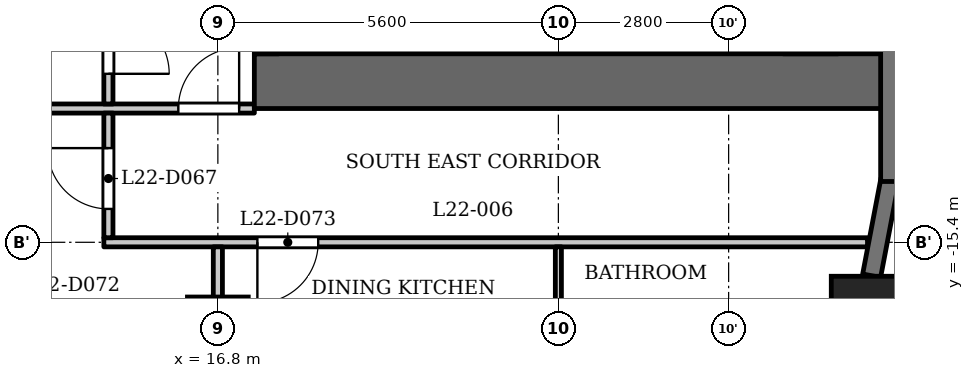
"""IFC4 building model, lengths in metres.
Left out: names, types, materials, properties, quantities, classifications, styles, units other than length and angle.
Written with IfcOpenShell. Run it as: python <this file> out.ifc"""

import sys

from ifc_helpers import new_model, si_unit, direction, frame, frame_2d, origin, origin_2d, place, context, subcontext, project, spatial, rectangle, extrude, element, fill, save


model = new_model("IFC4")
c1 = context("Model", 3, precision=1e-05, world=origin(), true_north=direction((0.0, 1.0)))
c2 = subcontext(c1, "Body", "Model", "MODEL_VIEW")
j1 = project(units=[si_unit("LENGTHUNIT", "METRE"), si_unit("PLANEANGLEUNIT", "RADIAN")], contexts=[c1])
p1 = place(None, origin())
s1 = spatial("IfcSite", under=j1, at=p1, CompositionType="ELEMENT")
p2 = place(p1, origin())
s2 = spatial("IfcBuilding", under=s1, at=p2, CompositionType="ELEMENT")
p3 = place(p2, frame((0.0, 0.0, 90.3)))
s3 = spatial("IfcBuildingStorey", under=s2, at=p3, CompositionType="ELEMENT", Elevation=90.3)
p4 = place(p3, frame((27.538, -16.609, 0.0), z_axis=(0.0, 0.0, 1.0), x_axis=(1.0, 0.0, 0.0)))
e1 = element("IfcColumn", 1, at=p4, inside=s3, PredefinedType="COLUMN", context=c2, shape_type="SweptSolid", body=[
    extrude(rectangle(XDim=1.3, YDim=1.3, at=origin_2d()), origin(), (0.0, 0.0, 1.0), 3.5),
])
p5 = place(p3, frame((16.8, -16.8, 0.0), z_axis=(0.0, 0.0, 1.0), x_axis=(1.0, 0.0, 0.0)))
e2 = element("IfcColumn", 2, at=p5, inside=s3, PredefinedType="COLUMN", context=c2, shape_type="SweptSolid", body=[
    extrude(rectangle(XDim=1.0, YDim=1.0, at=origin_2d()), origin(), (0.0, 0.0, 1.0), 3.5),
])
p6 = place(p3, frame((27.552, -15.949, 0.0), z_axis=(0.0, 0.0, 1.0), x_axis=(0.187279751651, 0.982306619453, 0.0)))
e3 = element("IfcWall", 3, at=p6, inside=s3, PredefinedType="SOLIDWALL", context=c2, shape_type="SweptSolid", body=[
    extrude(rectangle(XDim=1.606, YDim=0.3, at=frame_2d((0.803, 0.0))), origin(), (0.0, 0.0, 1.0), 2.4),
])
p7 = place(p3, frame((27.85, -14.4, 0.0), z_axis=(0.0, 0.0, 1.0), x_axis=(0.0, 1.0, 0.0)))
e4 = element("IfcWall", 4, at=p7, inside=s3, PredefinedType="SOLIDWALL", context=c2, shape_type="SweptSolid", body=[
    extrude(rectangle(XDim=2.55, YDim=0.3, at=frame_2d((1.275, 0.0))), origin(), (0.0, 0.0, 1.0), 2.4),
])
p8 = place(p3, frame((17.4, -12.75, 0.0), z_axis=(0.0, 0.0, 1.0), x_axis=(1.0, 0.0, 0.0)))
e5 = element("IfcWall", 5, at=p8, inside=s3, PredefinedType="SHEAR", context=c2, shape_type="SweptSolid", body=[
    extrude(rectangle(XDim=10.4, YDim=0.9, at=frame_2d((5.2, 0.0))), origin(), (0.0, 0.0, 1.0), 3.2),
])
p9 = place(p3, frame((17.6, -12.3, 0.0), z_axis=(0.0, 0.0, 1.0), x_axis=(0.0, 1.0, 0.0)))
e6 = element("IfcWall", 6, at=p9, inside=s3, PredefinedType="SHEAR", context=c2, shape_type="SweptSolid", body=[
    extrude(rectangle(XDim=24.6, YDim=0.4, at=frame_2d((12.3, 0.0))), origin(), (0.0, 0.0, 1.0), 3.2),
])
p10 = place(p9, frame((6.0, 0.0, 0.0)))
e7 = element("IfcOpeningElement", 7, at=p10, cuts=e6, PredefinedType="OPENING", context=c2, shape_type="SweptSolid", body=[
    extrude(rectangle(XDim=1.1, YDim=2.1, at=frame_2d((0.55, 1.05))), frame((0.0, 0.21, 0.0), z_axis=(0.0, -1.0, 0.0), x_axis=(1.0, 0.0, 0.0)), (0.0, 0.0, 1.0), 0.42),
])
p11 = place(p9, frame((8.4, 0.0, 0.0)))
e8 = element("IfcOpeningElement", 8, at=p11, cuts=e6, PredefinedType="OPENING", context=c2, shape_type="SweptSolid", body=[
    extrude(rectangle(XDim=1.1, YDim=2.1, at=frame_2d((0.55, 1.05))), frame((0.0, 0.21, 0.0), z_axis=(0.0, -1.0, 0.0), x_axis=(1.0, 0.0, 0.0)), (0.0, 0.0, 1.0), 0.42),
])
p12 = place(p9, frame((10.8, 0.0, 0.0)))
e9 = element("IfcOpeningElement", 9, at=p12, cuts=e6, PredefinedType="OPENING", context=c2, shape_type="SweptSolid", body=[
    extrude(rectangle(XDim=1.1, YDim=2.1, at=frame_2d((0.55, 1.05))), frame((0.0, 0.21, 0.0), z_axis=(0.0, -1.0, 0.0), x_axis=(1.0, 0.0, 0.0)), (0.0, 0.0, 1.0), 0.42),
])
p13 = place(p9, frame((16.75, 0.0, 0.0)))
e10 = element("IfcOpeningElement", 10, at=p13, cuts=e6, PredefinedType="OPENING", context=c2, shape_type="SweptSolid", body=[
    extrude(rectangle(XDim=0.9, YDim=2.1, at=frame_2d((0.45, 1.05))), frame((0.0, 0.21, 0.0), z_axis=(0.0, -1.0, 0.0), x_axis=(1.0, 0.0, 0.0)), (0.0, 0.0, 1.0), 0.42),
])
p14 = place(p9, frame((22.8, 0.0, 0.0)))
e11 = element("IfcOpeningElement", 11, at=p14, cuts=e6, PredefinedType="OPENING", context=c2, shape_type="SweptSolid", body=[
    extrude(rectangle(XDim=1.1, YDim=2.1, at=frame_2d((0.55, 1.05))), frame((0.0, 0.21, 0.0), z_axis=(0.0, -1.0, 0.0), x_axis=(1.0, 0.0, 0.0)), (0.0, 0.0, 1.0), 0.42),
])
p15 = place(p9, frame((0.7, 0.0, 0.0)))
e12 = element("IfcOpeningElement", 12, at=p15, cuts=e6, PredefinedType="OPENING", context=c2, shape_type="SweptSolid", body=[
    extrude(rectangle(XDim=1.1, YDim=2.1, at=frame_2d((0.55, 1.05))), frame((0.0, 0.21, 0.0), z_axis=(0.0, -1.0, 0.0), x_axis=(1.0, 0.0, 0.0)), (0.0, 0.0, 1.0), 0.42),
])
p16 = place(p9, frame((12.775, 0.0, 0.0)))
e13 = element("IfcOpeningElement", 13, at=p16, cuts=e6, PredefinedType="OPENING", context=c2, shape_type="SweptSolid", body=[
    extrude(rectangle(XDim=1.8, YDim=2.1, at=frame_2d((0.9, 1.05))), frame((0.0, 0.21, 0.0), z_axis=(0.0, -1.0, 0.0), x_axis=(1.0, 0.0, 0.0)), (0.0, 0.0, 1.0), 0.42),
])
p17 = place(p3, frame((26.55, -12.3, 0.0), z_axis=(0.0, 0.0, 1.0), x_axis=(0.0, 1.0, 0.0)))
e14 = element("IfcWall", 14, at=p17, inside=s3, PredefinedType="SHEAR", context=c2, shape_type="SweptSolid", body=[
    extrude(rectangle(XDim=24.6, YDim=0.9, at=frame_2d((12.3, 0.0))), origin(), (0.0, 0.0, 1.0), 3.2),
])
p18 = place(p3, frame((23.55, -12.3, 0.0), z_axis=(0.0, 0.0, 1.0), x_axis=(0.0, 1.0, 0.0)))
e15 = element("IfcWall", 15, at=p18, inside=s3, PredefinedType="PARTITIONING", context=c2, shape_type="SweptSolid", body=[
    extrude(rectangle(XDim=2.5, YDim=0.2, at=frame_2d((1.25, 0.0))), origin(), (0.0, 0.0, 1.0), 3.2),
])
p19 = place(p18, frame((0.8, 0.0, 0.0)))
e16 = element("IfcOpeningElement", 16, at=p19, cuts=e15, PredefinedType="OPENING", context=c2, shape_type="SweptSolid", body=[
    extrude(rectangle(XDim=0.9, YDim=2.1, at=frame_2d((0.45, 1.05))), frame((0.0, 0.11, 0.0), z_axis=(0.0, -1.0, 0.0), x_axis=(1.0, 0.0, 0.0)), (0.0, 0.0, 1.0), 0.22),
])
p20 = place(p3, frame((14.925, -15.4, 0.0), z_axis=(0.0, 0.0, 1.0), x_axis=(1.0, 0.0, 0.0)))
e17 = element("IfcWall", 17, at=p20, inside=s3, PredefinedType="PARTITIONING", context=c2, shape_type="SweptSolid", body=[
    extrude(rectangle(XDim=12.559, YDim=0.15, at=frame_2d((6.279, 0.0))), origin(), (0.0, 0.0, 1.0), 3.2),
])
p21 = place(p20, frame((2.525, 0.0, 0.0)))
e18 = element("IfcOpeningElement", 18, at=p21, cuts=e17, PredefinedType="OPENING", context=c2, shape_type="SweptSolid", body=[
    extrude(rectangle(XDim=1.0, YDim=2.1, at=frame_2d((0.5, 1.05))), frame((0.0, 0.085, 0.0), z_axis=(0.0, -1.0, 0.0), x_axis=(1.0, 0.0, 0.0)), (0.0, 0.0, 1.0), 0.17),
])
p22 = place(p3, frame((-17.4, -13.2, 0.0), z_axis=(0.0, 0.0, 1.0), x_axis=(1.0, 0.0, 0.0)))
e19 = element("IfcWall", 19, at=p22, inside=s3, PredefinedType="PARTITIONING", context=c2, shape_type="SweptSolid", body=[
    extrude(rectangle(XDim=34.8, YDim=0.15, at=frame_2d((17.4, 0.0))), origin(), (0.0, 0.0, 1.0), 3.2),
])
p23 = place(p22, frame((0.15, 0.0, 0.0)))
e20 = element("IfcOpeningElement", 20, at=p23, cuts=e19, PredefinedType="OPENING", context=c2, shape_type="SweptSolid", body=[
    extrude(rectangle(XDim=1.0, YDim=2.1, at=frame_2d((0.5, 1.05))), frame((0.0, 0.085, 0.0), z_axis=(0.0, -1.0, 0.0), x_axis=(1.0, 0.0, 0.0)), (0.0, 0.0, 1.0), 0.17),
])
p24 = place(p22, frame((33.55, 0.0, 0.0)))
e21 = element("IfcOpeningElement", 21, at=p24, cuts=e19, PredefinedType="OPENING", context=c2, shape_type="SweptSolid", body=[
    extrude(rectangle(XDim=1.0, YDim=2.1, at=frame_2d((0.5, 1.05))), frame((0.0, 0.085, 0.0), z_axis=(0.0, -1.0, 0.0), x_axis=(1.0, 0.0, 0.0)), (0.0, 0.0, 1.0), 0.17),
])
p25 = place(p22, frame((7.35, 0.0, 0.0)))
e22 = element("IfcOpeningElement", 22, at=p25, cuts=e19, PredefinedType="OPENING", context=c2, shape_type="SweptSolid", body=[
    extrude(rectangle(XDim=1.0, YDim=2.1, at=frame_2d((0.5, 1.05))), frame((0.0, 0.085, 0.0), z_axis=(0.0, -1.0, 0.0), x_axis=(1.0, 0.0, 0.0)), (0.0, 0.0, 1.0), 0.17),
])
p26 = place(p22, frame((13.7, 0.0, 0.0)))
e23 = element("IfcOpeningElement", 23, at=p26, cuts=e19, PredefinedType="OPENING", context=c2, shape_type="SweptSolid", body=[
    extrude(rectangle(XDim=1.0, YDim=2.1, at=frame_2d((0.5, 1.05))), frame((0.0, 0.085, 0.0), z_axis=(0.0, -1.0, 0.0), x_axis=(1.0, 0.0, 0.0)), (0.0, 0.0, 1.0), 0.17),
])
p27 = place(p22, frame((19.3, 0.0, 0.0)))
e24 = element("IfcOpeningElement", 24, at=p27, cuts=e19, PredefinedType="OPENING", context=c2, shape_type="SweptSolid", body=[
    extrude(rectangle(XDim=1.0, YDim=2.1, at=frame_2d((0.5, 1.05))), frame((0.0, 0.085, 0.0), z_axis=(0.0, -1.0, 0.0), x_axis=(1.0, 0.0, 0.0)), (0.0, 0.0, 1.0), 0.17),
])
p28 = place(p3, frame((15.0, -15.325, 0.0), z_axis=(0.0, 0.0, 1.0), x_axis=(0.0, 1.0, 0.0)))
e25 = element("IfcWall", 25, at=p28, inside=s3, PredefinedType="PARTITIONING", context=c2, shape_type="SweptSolid", body=[
    extrude(rectangle(XDim=2.05, YDim=0.15, at=frame_2d((1.025, 0.0))), origin(), (0.0, 0.0, 1.0), 3.2),
])
p29 = place(p28, frame((0.474, 0.0, 0.0)))
e26 = element("IfcOpeningElement", 26, at=p29, cuts=e25, PredefinedType="OPENING", context=c2, shape_type="SweptSolid", body=[
    extrude(rectangle(XDim=1.0, YDim=2.1, at=frame_2d((0.5, 1.05))), frame((0.0, 0.085, 0.0), z_axis=(0.0, -1.0, 0.0), x_axis=(1.0, 0.0, 0.0)), (0.0, 0.0, 1.0), 0.17),
])
p30 = place(p3, frame((15.0, -13.125, 0.0), z_axis=(0.0, 0.0, 1.0), x_axis=(0.0, 1.0, 0.0)))
e27 = element("IfcWall", 27, at=p30, inside=s3, PredefinedType="PARTITIONING", context=c2, shape_type="SweptSolid", body=[
    extrude(rectangle(XDim=6.356, YDim=0.15, at=frame_2d((3.178, 0.0))), origin(), (0.0, 0.0, 1.0), 3.2),
])
p31 = place(p30, frame((0.496, 0.0, 0.0)))
e28 = element("IfcOpeningElement", 28, at=p31, cuts=e27, PredefinedType="OPENING", context=c2, shape_type="SweptSolid", body=[
    extrude(rectangle(XDim=1.0, YDim=2.1, at=frame_2d((0.5, 1.05))), frame((0.0, 0.085, 0.0), z_axis=(0.0, -1.0, 0.0), x_axis=(1.0, 0.0, 0.0)), (0.0, 0.0, 1.0), 0.17),
])
p32 = place(p3, frame((16.8, -23.03, 0.0), z_axis=(0.0, 0.0, 1.0), x_axis=(0.0, 1.0, 0.0)))
e29 = element("IfcWall", 29, at=p32, inside=s3, PredefinedType="PARTITIONING", context=c2, shape_type="SweptSolid", body=[
    extrude(rectangle(XDim=7.555, YDim=0.15, at=frame_2d((3.777, 0.0))), origin(), (0.0, 0.0, 1.0), 3.2),
])
p33 = place(p3, frame((22.4, -18.05, 0.0), z_axis=(0.0, 0.0, 1.0), x_axis=(0.0, 1.0, 0.0)))
e30 = element("IfcWall", 30, at=p33, inside=s3, PredefinedType="PARTITIONING", context=c2, shape_type="SweptSolid", body=[
    extrude(rectangle(XDim=2.575, YDim=0.1, at=frame_2d((1.288, 0.0))), origin(), (0.0, 0.0, 1.0), 3.2),
])
p34 = place(p31, origin())
e31 = element("IfcDoor", 31, at=p34, inside=s3, OperationType="SINGLE_SWING_LEFT", PredefinedType="DOOR", context=c2, shape_type="SweptSolid", body=[
    extrude(rectangle(XDim=1.0, YDim=2.1, at=frame_2d((0.5, 1.05))), frame((0.0, 0.025, 0.0), z_axis=(0.0, -1.0, 0.0), x_axis=(1.0, 0.0, 0.0)), (0.0, 0.0, 1.0), 0.05),
])
fill(e28, e31)
p35 = place(p24, origin())
e32 = element("IfcDoor", 32, at=p35, inside=s3, OperationType="SINGLE_SWING_LEFT", PredefinedType="DOOR", context=c2, shape_type="SweptSolid", body=[
    extrude(rectangle(XDim=1.0, YDim=2.1, at=frame_2d((0.5, 1.05))), frame((0.0, 0.025, 0.0), z_axis=(0.0, -1.0, 0.0), x_axis=(1.0, 0.0, 0.0)), (0.0, 0.0, 1.0), 0.05),
])
fill(e21, e32)
p36 = place(p29, origin())
e33 = element("IfcDoor", 33, at=p36, inside=s3, OperationType="SINGLE_SWING_LEFT", PredefinedType="DOOR", context=c2, shape_type="SweptSolid", body=[
    extrude(rectangle(XDim=1.0, YDim=2.1, at=frame_2d((0.5, 1.05))), frame((0.0, 0.025, 0.0), z_axis=(0.0, -1.0, 0.0), x_axis=(1.0, 0.0, 0.0)), (0.0, 0.0, 1.0), 0.05),
])
fill(e26, e33)
p37 = place(p21, origin())
e34 = element("IfcDoor", 34, at=p37, inside=s3, OperationType="SINGLE_SWING_LEFT", PredefinedType="DOOR", context=c2, shape_type="SweptSolid", body=[
    extrude(rectangle(XDim=1.0, YDim=2.1, at=frame_2d((0.5, 1.05))), frame((0.0, 0.025, 0.0), z_axis=(0.0, -1.0, 0.0), x_axis=(1.0, 0.0, 0.0)), (0.0, 0.0, 1.0), 0.05),
])
fill(e18, e34)
save(model, sys.argv[1])
